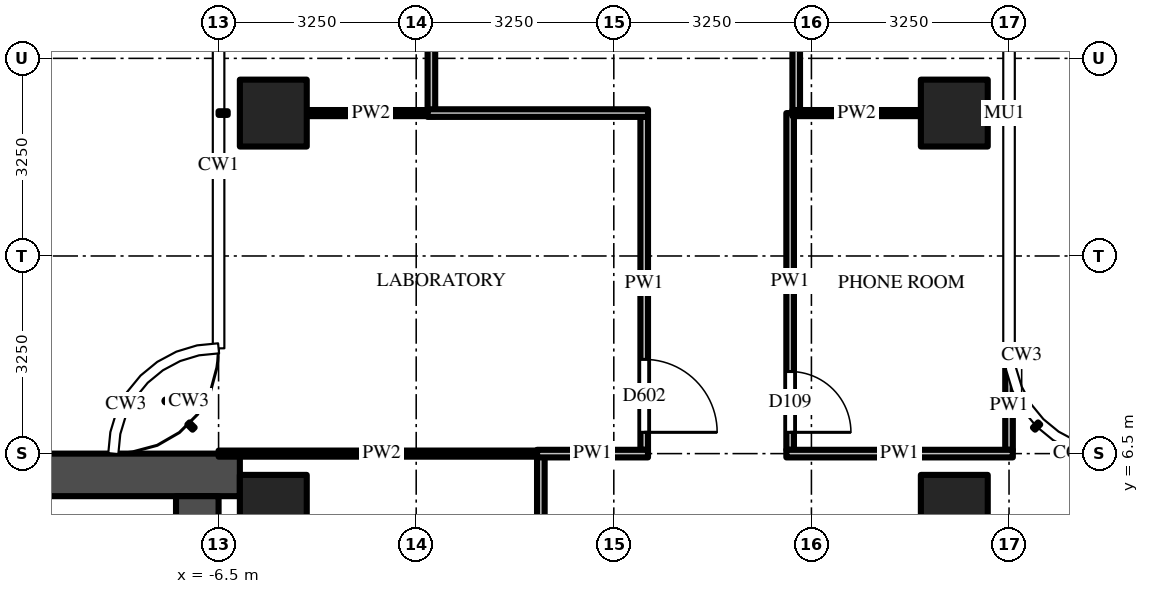
"""IFC4 building model, lengths in metres.
Left out: names, types, materials, properties, quantities, classifications, styles, units other than length and angle.
Written with IfcOpenShell. Run it as: python <this file> out.ifc"""

import sys

from ifc_helpers import new_model, si_unit, direction, frame, frame_2d, origin, origin_2d, place, context, subcontext, project, spatial, rectangle, extrude, source, transform, mapped, element, fill, save


model = new_model("IFC4")
c1 = context("Model", 3, precision=1e-05, world=origin(), true_north=direction((0.0, 1.0)))
c2 = subcontext(c1, "Body", "Model", "MODEL_VIEW")
j1 = project(units=[si_unit("LENGTHUNIT", "METRE"), si_unit("PLANEANGLEUNIT", "RADIAN")], contexts=[c1])
p1 = place(None, origin())
s1 = spatial("IfcSite", under=j1, at=p1, CompositionType="ELEMENT")
p2 = place(p1, origin())
s2 = spatial("IfcBuilding", under=s1, at=p2, CompositionType="ELEMENT")
p3 = place(p2, frame((0.0, 0.0, 232.4)))
s3 = spatial("IfcBuildingStorey", under=s2, at=p3, CompositionType="ELEMENT", Elevation=232.4)
m1 = source(origin(), c2, "Body", "SweptSolid", [
    extrude(rectangle(XDim=1.1, YDim=1.1, at=origin_2d()), origin(), (0.0, 0.0, 1.0), 3.9),
])
for number, where, z_axis, x_axis in (
    (1, (-5.6, 12.1, 0.0), (0.0, 0.0, 1.0), (1.0, 0.0, 0.0)),
    (2, (5.6, 12.1, 0.0), (0.0, 0.0, 1.0), (1.0, 0.0, 0.0)),
    (3, (5.6, 5.6, 0.0), (0.0, 0.0, 1.0), (1.0, 0.0, 0.0)),
    (4, (-5.6, 5.6, 0.0), (0.0, 0.0, 1.0), (1.0, 0.0, 0.0)),
):
    element("IfcColumn", number, at=place(p3, frame(where, z_axis=z_axis, x_axis=x_axis)), inside=s3, PredefinedType="COLUMN", context=c2, shape_type="MappedRepresentation", body=[
        mapped(m1, transform((0.0, 0.0, 0.0))),
    ])
m2 = source(origin(), c2, "Body", "SweptSolid", [
    extrude(rectangle(XDim=16.6, YDim=0.7, at=frame_2d((8.3, 0.0))), origin(), (0.0, 0.0, 1.0), 3.7),
])
p4 = place(p3, frame((-6.15, 6.15, 0.0), z_axis=(0.0, 0.0, 1.0), x_axis=(-1.0, 0.0, 0.0)))
e5 = element("IfcWall", 5, at=p4, inside=s3, PredefinedType="SHEAR", context=c2, shape_type="MappedRepresentation", body=[
    mapped(m2, transform((0.0, 0.0, 0.0))),
])
m3 = source(origin(), c2, "Body", "SweptSolid", [
    extrude(rectangle(XDim=9.05, YDim=0.7, at=frame_2d((4.525, 0.0))), origin(), (0.0, 0.0, 1.0), 3.7),
])
p5 = place(p3, frame((-6.85, 5.8, 0.0), z_axis=(0.0, 0.0, 1.0), x_axis=(0.0, -1.0, 0.0)))
e6 = element("IfcWall", 6, at=p5, inside=s3, PredefinedType="SHEAR", context=c2, shape_type="MappedRepresentation", body=[
    mapped(m3, transform((0.0, 0.0, 0.0))),
])
m4 = source(origin(), c2, "Body", "SweptSolid", [
    extrude(rectangle(XDim=1.8, YDim=2.1, at=frame_2d((0.9, 1.05))), frame((0.0, 0.36, 0.0), z_axis=(0.0, -1.0, 0.0), x_axis=(1.0, 0.0, 0.0)), (0.0, 0.0, 1.0), 0.72),
])
p6 = place(p5, frame((3.15, 0.0, 0.0)))
e7 = element("IfcOpeningElement", 7, at=p6, cuts=e6, PredefinedType="OPENING", context=c2, shape_type="MappedRepresentation", body=[
    mapped(m4, transform((0.0, 0.0, 0.0))),
])
m5 = source(origin(), c2, "Body", "SweptSolid", [
    extrude(rectangle(XDim=8.788, YDim=0.125, at=frame_2d((4.394, 0.0))), origin(), (0.0, 0.0, 1.0), 2.78),
])
p7 = place(p3, frame((-3.0, 12.15, 0.0), z_axis=(0.0, 0.0, 1.0), x_axis=(0.0, 1.0, 0.0)))
e8 = element("IfcWall", 8, at=p7, inside=s3, PredefinedType="PARTITIONING", context=c2, shape_type="MappedRepresentation", body=[
    mapped(m5, transform((0.0, 0.0, 0.0))),
])
m6 = source(origin(), c2, "Body", "SweptSolid", [
    extrude(rectangle(XDim=1.0, YDim=2.1, at=frame_2d((0.5, 1.05))), frame((0.0, 0.073, 0.0), z_axis=(0.0, -1.0, 0.0), x_axis=(1.0, 0.0, 0.0)), (0.0, 0.0, 1.0), 0.145),
])
p8 = place(p7, frame((6.0, 0.0, 0.0)))
e9 = element("IfcOpeningElement", 9, at=p8, cuts=e8, PredefinedType="OPENING", context=c2, shape_type="MappedRepresentation", body=[
    mapped(m6, transform((0.0, 0.0, 0.0))),
])
m7 = source(origin(), c2, "Body", "SweptSolid", [
    extrude(rectangle(XDim=3.137, YDim=0.125, at=frame_2d((1.569, 0.0))), origin(), (0.0, 0.0, 1.0), 2.997),
])
p9 = place(p3, frame((-1.2, 6.45, 0.0), z_axis=(0.0, 0.0, 1.0), x_axis=(0.0, -1.0, 0.0)))
e10 = element("IfcWall", 10, at=p9, inside=s3, PredefinedType="PARTITIONING", context=c2, shape_type="MappedRepresentation", body=[
    mapped(m7, transform((0.0, 0.0, 0.0))),
])
m8 = source(origin(), c2, "Body", "SweptSolid", [
    extrude(rectangle(XDim=5.475, YDim=0.125, at=frame_2d((2.738, 0.0))), origin(), (0.0, 0.0, 1.0), 2.997),
])
p10 = place(p3, frame((0.5, 12.038, 0.0), z_axis=(0.0, 0.0, 1.0), x_axis=(0.0, -1.0, 0.0)))
e11 = element("IfcWall", 11, at=p10, inside=s3, PredefinedType="PARTITIONING", context=c2, shape_type="MappedRepresentation", body=[
    mapped(m8, transform((0.0, 0.0, 0.0))),
])
m9 = source(origin(), c2, "Body", "SweptSolid", [
    extrude(rectangle(XDim=1.2, YDim=2.1, at=frame_2d((0.6, 1.05))), frame((0.0, 0.073, 0.0), z_axis=(0.0, -1.0, 0.0), x_axis=(1.0, 0.0, 0.0)), (0.0, 0.0, 1.0), 0.145),
])
p11 = place(p10, frame((3.988, 0.0, 0.0)))
e12 = element("IfcOpeningElement", 12, at=p11, cuts=e11, PredefinedType="OPENING", context=c2, shape_type="MappedRepresentation", body=[
    mapped(m9, transform((0.0, 0.0, 0.0))),
])
m10 = source(origin(), c2, "Body", "SweptSolid", [
    extrude(rectangle(XDim=5.538, YDim=0.125, at=frame_2d((2.769, 0.0))), origin(), (0.0, 0.0, 1.0), 2.997),
])
p12 = place(p3, frame((2.9, 12.1, 0.0), z_axis=(0.0, 0.0, 1.0), x_axis=(0.0, -1.0, 0.0)))
e13 = element("IfcWall", 13, at=p12, inside=s3, PredefinedType="PARTITIONING", context=c2, shape_type="MappedRepresentation", body=[
    mapped(m10, transform((0.0, 0.0, 0.0))),
])
p13 = place(p12, frame((4.25, 0.0, 0.0)))
e14 = element("IfcOpeningElement", 14, at=p13, cuts=e13, PredefinedType="OPENING", context=c2, shape_type="MappedRepresentation", body=[
    mapped(m6, transform((0.0, 0.0, 0.0))),
])
m11 = source(origin(), c2, "Body", "SweptSolid", [
    extrude(rectangle(XDim=8.85, YDim=0.125, at=frame_2d((4.425, 0.0))), origin(), (0.0, 0.0, 1.0), 2.78),
])
p14 = place(p3, frame((3.0, 21.0, 0.0), z_axis=(0.0, 0.0, 1.0), x_axis=(0.0, -1.0, 0.0)))
e15 = element("IfcWall", 15, at=p14, inside=s3, PredefinedType="PARTITIONING", context=c2, shape_type="MappedRepresentation", body=[
    mapped(m11, transform((0.0, 0.0, 0.0))),
])
p15 = place(p14, frame((1.85, 0.0, 0.0)))
e16 = element("IfcOpeningElement", 16, at=p15, cuts=e15, PredefinedType="OPENING", context=c2, shape_type="MappedRepresentation", body=[
    mapped(m6, transform((0.0, 0.0, 0.0))),
])
m12 = source(origin(), c2, "Body", "SweptSolid", [
    extrude(rectangle(XDim=1.469, YDim=0.125, at=frame_2d((0.734, 0.0))), origin(), (0.0, 0.0, 1.0), 3.7),
])
p16 = place(p3, frame((6.5, 6.562, 0.0), z_axis=(0.0, 0.0, 1.0), x_axis=(0.0, 1.0, 0.0)))
e17 = element("IfcWall", 17, at=p16, inside=s3, PredefinedType="PARTITIONING", context=c2, shape_type="MappedRepresentation", body=[
    mapped(m12, transform((0.0, 0.0, 0.0))),
])
m13 = source(origin(), c2, "Body", "SweptSolid", [
    extrude(rectangle(XDim=5.363, YDim=0.1, at=frame_2d((2.681, 0.0))), origin(), (0.0, 0.0, 1.0), 2.78),
])
p17 = place(p3, frame((-6.5, 6.5, 0.0), z_axis=(0.0, 0.0, 1.0), x_axis=(1.0, 0.0, 0.0)))
e18 = element("IfcWall", 18, at=p17, inside=s3, PredefinedType="PARTITIONING", context=c2, shape_type="MappedRepresentation", body=[
    mapped(m13, transform((0.0, 0.0, 0.0))),
])
m14 = source(origin(), c2, "Body", "SweptSolid", [
    extrude(rectangle(XDim=1.825, YDim=0.125, at=frame_2d((0.913, 0.0))), origin(), (0.0, 0.0, 1.0), 3.7),
])
p18 = place(p3, frame((-1.262, 6.5, 0.0), z_axis=(0.0, 0.0, 1.0), x_axis=(1.0, 0.0, 0.0)))
e19 = element("IfcWall", 19, at=p18, inside=s3, PredefinedType="PARTITIONING", context=c2, shape_type="MappedRepresentation", body=[
    mapped(m14, transform((0.0, 0.0, 0.0))),
])
m15 = source(origin(), c2, "Body", "SweptSolid", [
    extrude(rectangle(XDim=3.725, YDim=0.125, at=frame_2d((1.863, 0.0))), origin(), (0.0, 0.0, 1.0), 2.78),
])
p19 = place(p3, frame((2.837, 6.5, 0.0), z_axis=(0.0, 0.0, 1.0), x_axis=(1.0, 0.0, 0.0)))
e20 = element("IfcWall", 20, at=p19, inside=s3, PredefinedType="PARTITIONING", context=c2, shape_type="MappedRepresentation", body=[
    mapped(m15, transform((0.0, 0.0, 0.0))),
])
m16 = source(origin(), c2, "Body", "SweptSolid", [
    extrude(rectangle(XDim=2.113, YDim=0.1, at=frame_2d((1.056, 0.0))), origin(), (0.0, 0.0, 1.0), 2.997),
])
for number, where, z_axis, x_axis in (
    (21, (-5.05, 12.1, 0.0), (0.0, 0.0, 1.0), (1.0, 0.0, 0.0)),
    (22, (2.938, 12.1, 0.0), (0.0, 0.0, 1.0), (1.0, 0.0, 0.0)),
):
    element("IfcWall", number, at=place(p3, frame(where, z_axis=z_axis, x_axis=x_axis)), inside=s3, PredefinedType="PARTITIONING", context=c2, shape_type="MappedRepresentation", body=[
        mapped(m16, transform((0.0, 0.0, 0.0))),
    ])
m17 = source(origin(), c2, "Body", "SweptSolid", [
    extrude(rectangle(XDim=3.625, YDim=0.125, at=frame_2d((1.812, 0.0))), origin(), (0.0, 0.0, 1.0), 2.997),
])
p20 = place(p3, frame((0.562, 12.1, 0.0), z_axis=(0.0, 0.0, 1.0), x_axis=(-1.0, 0.0, 0.0)))
e23 = element("IfcWall", 23, at=p20, inside=s3, PredefinedType="PARTITIONING", context=c2, shape_type="MappedRepresentation", body=[
    mapped(m17, transform((0.0, 0.0, 0.0))),
])
m18 = source(origin(), c2, "Body", "SweptSolid", [
    extrude(rectangle(XDim=1.0, YDim=2.1, at=frame_2d((0.5, 1.05))), frame((0.0, 0.025, 0.0), z_axis=(0.0, -1.0, 0.0), x_axis=(1.0, 0.0, 0.0)), (0.0, 0.0, 1.0), 0.05),
])
p21 = place(p13, origin())
e24 = element("IfcDoor", 24, at=p21, inside=s3, OperationType="SINGLE_SWING_RIGHT", PredefinedType="DOOR", context=c2, shape_type="MappedRepresentation", body=[
    mapped(m18, transform((0.0, 0.0, 0.0))),
])
fill(e14, e24)
m19 = source(origin(), c2, "Body", "SweptSolid", [
    extrude(rectangle(XDim=1.2, YDim=2.1, at=frame_2d((0.6, 1.05))), frame((0.0, 0.025, 0.0), z_axis=(0.0, -1.0, 0.0), x_axis=(1.0, 0.0, 0.0)), (0.0, 0.0, 1.0), 0.05),
])
p22 = place(p11, origin())
e25 = element("IfcDoor", 25, at=p22, inside=s3, OperationType="SINGLE_SWING_RIGHT", PredefinedType="DOOR", context=c2, shape_type="MappedRepresentation", body=[
    mapped(m19, transform((0.0, 0.0, 0.0))),
])
fill(e12, e25)
save(model, sys.argv[1])
